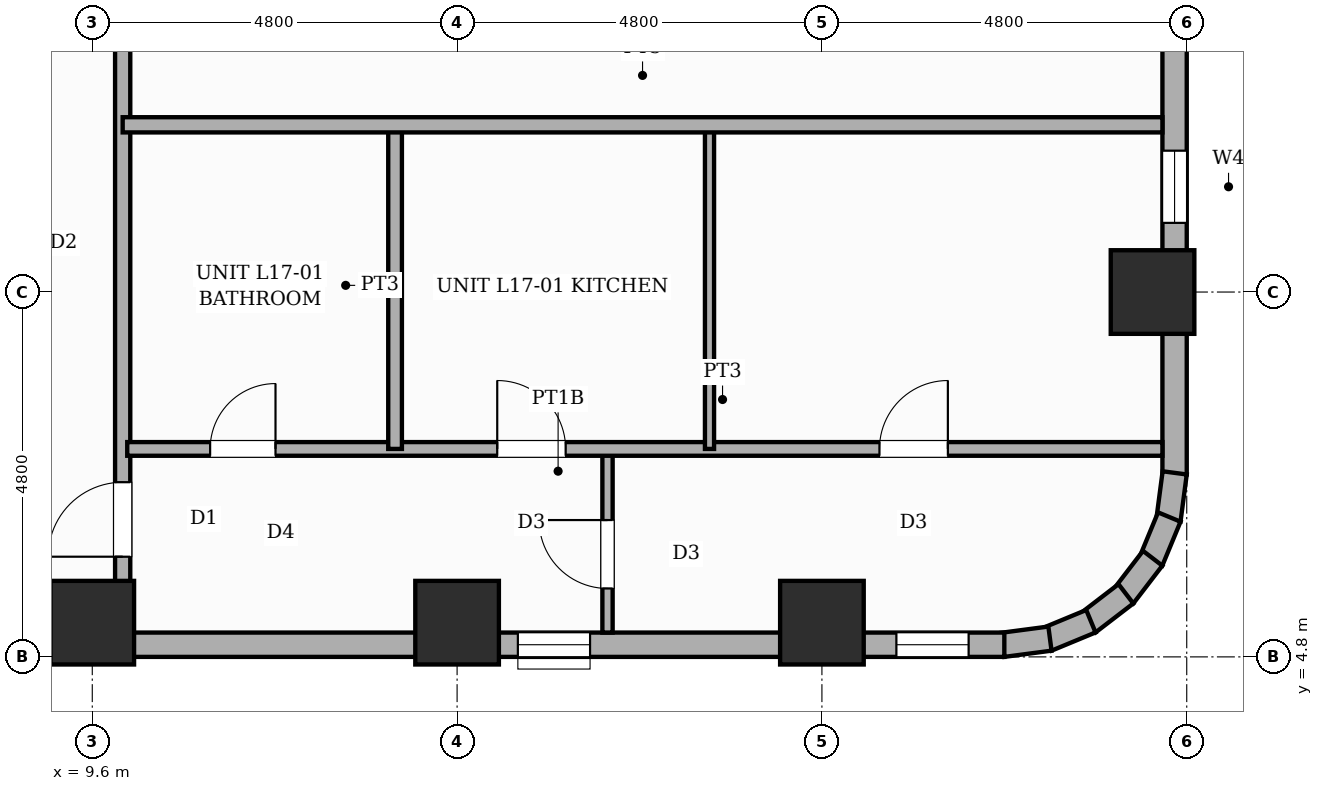
"""IFC4 building model, lengths in metres.
Left out: names, types, materials, properties, quantities, classifications, styles, units other than length and angle.
Written with IfcOpenShell. Run it as: python <this file> out.ifc"""

import sys

from ifc_helpers import new_model, si_unit, direction, frame, frame_2d, origin, origin_2d, place, context, subcontext, project, spatial, rectangle, extrude, element, fill, save


model = new_model("IFC4")
c1 = context("Model", 3, precision=1e-05, world=origin(), true_north=direction((0.0, 1.0)))
c2 = subcontext(c1, "Body", "Model", "MODEL_VIEW")
j1 = project(units=[si_unit("LENGTHUNIT", "METRE"), si_unit("PLANEANGLEUNIT", "RADIAN")], contexts=[c1])
p1 = place(None, origin())
s1 = spatial("IfcSite", under=j1, at=p1, CompositionType="ELEMENT")
p2 = place(p1, origin())
s2 = spatial("IfcBuilding", under=s1, at=p2, CompositionType="ELEMENT")
p3 = place(p2, frame((0.0, 0.0, 68.2)))
s3 = spatial("IfcBuildingStorey", under=s2, at=p3, CompositionType="ELEMENT", Elevation=68.2)
for number, where, z_axis, x_axis in (
    (1, (9.6, 5.25, 0.0), (0.0, 0.0, 1.0), (1.0, 0.0, 0.0)),
    (2, (14.4, 5.25, 0.0), (0.0, 0.0, 1.0), (1.0, 0.0, 0.0)),
    (3, (19.2, 5.25, 0.0), (0.0, 0.0, 1.0), (1.0, 0.0, 0.0)),
    (4, (23.55, 9.6, 0.0), (0.0, 0.0, 1.0), (1.0, 0.0, 0.0)),
):
    element("IfcColumn", number, at=place(p3, frame(where, z_axis=z_axis, x_axis=x_axis)), inside=s3, PredefinedType="COLUMN", context=c2, shape_type="SweptSolid", body=[
        extrude(rectangle(XDim=1.1, YDim=1.1, at=origin_2d()), origin(), (0.0, 0.0, 1.0), 3.6),
    ])
p4 = place(p3, frame((23.84, 26.4, 0.0), z_axis=(0.0, 0.0, 1.0), x_axis=(0.0, -1.0, 0.0)))
e5 = element("IfcWall", 5, at=p4, inside=s3, PredefinedType="STANDARD", context=c2, shape_type="SweptSolid", body=[
    extrude(rectangle(XDim=19.2, YDim=0.32, at=frame_2d((9.6, 0.0))), origin(), (0.0, 0.0, 1.0), 2.53),
])
p5 = place(p4, frame((14.94, 0.0, 0.45)))
e6 = element("IfcOpeningElement", 6, at=p5, cuts=e5, PredefinedType="OPENING", context=c2, shape_type="SweptSolid", body=[
    extrude(rectangle(XDim=0.95, YDim=1.8, at=frame_2d((0.475, 0.9))), frame((0.0, 0.17, 0.0), z_axis=(0.0, -1.0, 0.0), x_axis=(1.0, 0.0, 0.0)), (0.0, 0.0, 1.0), 0.34),
])
p6 = place(p4, frame((8.204, 0.0, 0.65)))
e7 = element("IfcOpeningElement", 7, at=p6, cuts=e5, PredefinedType="OPENING", context=c2, shape_type="SweptSolid", body=[
    extrude(rectangle(XDim=1.4, YDim=1.1, at=frame_2d((0.7, 0.55))), frame((0.0, 0.17, 0.0), z_axis=(0.0, -1.0, 0.0), x_axis=(1.0, 0.0, 0.0)), (0.0, 0.0, 1.0), 0.34),
])
p7 = place(p4, frame((0.88, 0.0, 0.45)))
e8 = element("IfcOpeningElement", 8, at=p7, cuts=e5, PredefinedType="OPENING", context=c2, shape_type="SweptSolid", body=[
    extrude(rectangle(XDim=0.75, YDim=1.8, at=frame_2d((0.375, 0.9))), frame((0.0, 0.17, 0.0), z_axis=(0.0, -1.0, 0.0), x_axis=(1.0, 0.0, 0.0)), (0.0, 0.0, 1.0), 0.34),
])
p8 = place(p4, frame((10.259, 0.0, 0.45)))
e9 = element("IfcOpeningElement", 9, at=p8, cuts=e5, PredefinedType="OPENING", context=c2, shape_type="SweptSolid", body=[
    extrude(rectangle(XDim=0.95, YDim=1.8, at=frame_2d((0.475, 0.9))), frame((0.0, 0.17, 0.0), z_axis=(0.0, -1.0, 0.0), x_axis=(1.0, 0.0, 0.0)), (0.0, 0.0, 1.0), 0.34),
])
p9 = place(p4, frame((4.838, 0.0, 0.65)))
e10 = element("IfcOpeningElement", 10, at=p9, cuts=e5, PredefinedType="OPENING", context=c2, shape_type="SweptSolid", body=[
    extrude(rectangle(XDim=1.4, YDim=1.1, at=frame_2d((0.7, 0.55))), frame((0.0, 0.17, 0.0), z_axis=(0.0, -1.0, 0.0), x_axis=(1.0, 0.0, 0.0)), (0.0, 0.0, 1.0), 0.34),
])
p10 = place(p3, frame((23.841, 7.221, 0.0), z_axis=(0.0, 0.0, 1.0), x_axis=(-0.130504898859, -0.991447664465, 0.0)))
e11 = element("IfcWall", 11, at=p10, inside=s3, PredefinedType="STANDARD", context=c2, shape_type="SweptSolid", body=[
    extrude(rectangle(XDim=0.627, YDim=0.32, at=frame_2d((0.313, 0.0))), origin(), (0.0, 0.0, 1.0), 3.35),
])
p11 = place(p3, frame((23.771, 6.64, 0.0), z_axis=(0.0, 0.0, 1.0), x_axis=(-0.382787856107, -0.923836271867, 0.0)))
e12 = element("IfcWall", 12, at=p11, inside=s3, PredefinedType="STANDARD", context=c2, shape_type="SweptSolid", body=[
    extrude(rectangle(XDim=0.626, YDim=0.32, at=frame_2d((0.313, 0.0))), origin(), (0.0, 0.0, 1.0), 3.35),
])
p12 = place(p3, frame((23.552, 6.097, 0.0), z_axis=(0.0, 0.0, 1.0), x_axis=(-0.608693302629, -0.793405610854, 0.0)))
e13 = element("IfcWall", 13, at=p12, inside=s3, PredefinedType="STANDARD", context=c2, shape_type="SweptSolid", body=[
    extrude(rectangle(XDim=0.626, YDim=0.32, at=frame_2d((0.313, 0.0))), origin(), (0.0, 0.0, 1.0), 3.35),
])
p13 = place(p3, frame((23.2, 5.63, 0.0), z_axis=(0.0, 0.0, 1.0), x_axis=(-0.7932174212, -0.608938521285, 0.0)))
e14 = element("IfcWall", 14, at=p13, inside=s3, PredefinedType="STANDARD", context=c2, shape_type="SweptSolid", body=[
    extrude(rectangle(XDim=0.627, YDim=0.32, at=frame_2d((0.313, 0.0))), origin(), (0.0, 0.0, 1.0), 3.35),
])
for number, where, z_axis, x_axis in (
    (15, (22.739, 5.269, 0.0), (0.0, 0.0, 1.0), (-0.924, -0.383, 0.0)),
    (16, (22.2, 5.04, 0.0), (0.0, 0.0, 1.0), (-0.991, -0.131, 0.0)),
):
    element("IfcWall", number, at=place(p3, frame(where, z_axis=z_axis, x_axis=x_axis)), inside=s3, PredefinedType="STANDARD", context=c2, shape_type="SweptSolid", body=[
        extrude(rectangle(XDim=0.626, YDim=0.32, at=frame_2d((0.313, 0.0))), origin(), (0.0, 0.0, 1.0), 3.35),
    ])
p14 = place(p3, frame((21.6, 4.96, 0.0), z_axis=(0.0, 0.0, 1.0), x_axis=(-1.0, 0.0, 0.0)))
e17 = element("IfcWall", 17, at=p14, inside=s3, PredefinedType="STANDARD", context=c2, shape_type="SweptSolid", body=[
    extrude(rectangle(XDim=14.4, YDim=0.32, at=frame_2d((7.2, 0.0))), origin(), (0.0, 0.0, 1.0), 2.53),
])
p15 = place(p14, frame((5.45, 0.0, 0.45)))
e18 = element("IfcOpeningElement", 18, at=p15, cuts=e17, PredefinedType="OPENING", context=c2, shape_type="SweptSolid", body=[
    extrude(rectangle(XDim=0.95, YDim=1.8, at=frame_2d((0.475, 0.9))), frame((0.0, 0.17, 0.0), z_axis=(0.0, -1.0, 0.0), x_axis=(1.0, 0.0, 0.0)), (0.0, 0.0, 1.0), 0.34),
])
p16 = place(p14, frame((0.47, 0.0, 0.45)))
e19 = element("IfcOpeningElement", 19, at=p16, cuts=e17, PredefinedType="OPENING", context=c2, shape_type="SweptSolid", body=[
    extrude(rectangle(XDim=0.95, YDim=1.8, at=frame_2d((0.475, 0.9))), frame((0.0, 0.17, 0.0), z_axis=(0.0, -1.0, 0.0), x_axis=(1.0, 0.0, 0.0)), (0.0, 0.0, 1.0), 0.34),
])
p17 = place(p3, frame((10.0, 5.12, 0.0), z_axis=(0.0, 0.0, 1.0), x_axis=(0.0, 1.0, 0.0)))
e20 = element("IfcWall", 20, at=p17, inside=s3, PredefinedType="PARTITIONING", context=c2, shape_type="SweptSolid", body=[
    extrude(rectangle(XDim=20.63, YDim=0.2, at=frame_2d((10.315, 0.0))), origin(), (0.0, 0.0, 1.0), 3.35),
])
p18 = place(p17, frame((0.998, 0.0, 0.0)))
e21 = element("IfcOpeningElement", 21, at=p18, cuts=e20, PredefinedType="OPENING", context=c2, shape_type="SweptSolid", body=[
    extrude(rectangle(XDim=0.98, YDim=2.18, at=frame_2d((0.49, 1.09))), frame((0.0, 0.11, 0.0), z_axis=(0.0, -1.0, 0.0), x_axis=(1.0, 0.0, 0.0)), (0.0, 0.0, 1.0), 0.22),
])
p19 = place(p17, frame((8.491, 0.0, 0.0)))
e22 = element("IfcOpeningElement", 22, at=p19, cuts=e20, PredefinedType="OPENING", context=c2, shape_type="SweptSolid", body=[
    extrude(rectangle(XDim=0.98, YDim=2.18, at=frame_2d((0.49, 1.09))), frame((0.0, 0.11, 0.0), z_axis=(0.0, -1.0, 0.0), x_axis=(1.0, 0.0, 0.0)), (0.0, 0.0, 1.0), 0.22),
])
p20 = place(p17, frame((14.787, 0.0, 0.0)))
e23 = element("IfcOpeningElement", 23, at=p20, cuts=e20, PredefinedType="OPENING", context=c2, shape_type="SweptSolid", body=[
    extrude(rectangle(XDim=0.98, YDim=2.18, at=frame_2d((0.49, 1.09))), frame((0.0, 0.11, 0.0), z_axis=(0.0, -1.0, 0.0), x_axis=(1.0, 0.0, 0.0)), (0.0, 0.0, 1.0), 0.22),
])
p21 = place(p3, frame((16.379, 5.12, 0.0), z_axis=(0.0, 0.0, 1.0), x_axis=(0.0, 1.0, 0.0)))
e24 = element("IfcWall", 24, at=p21, inside=s3, PredefinedType="PARTITIONING", context=c2, shape_type="SweptSolid", body=[
    extrude(rectangle(XDim=2.416, YDim=0.135, at=frame_2d((1.208, 0.0))), origin(), (0.0, 0.0, 1.0), 3.35),
])
p22 = place(p21, frame((0.58, 0.0, 0.0)))
e25 = element("IfcOpeningElement", 25, at=p22, cuts=e24, PredefinedType="OPENING", context=c2, shape_type="SweptSolid", body=[
    extrude(rectangle(XDim=0.9, YDim=2.15, at=frame_2d((0.45, 1.075))), frame((0.0, 0.078, 0.0), z_axis=(0.0, -1.0, 0.0), x_axis=(1.0, 0.0, 0.0)), (0.0, 0.0, 1.0), 0.155),
])
p23 = place(p3, frame((10.06, 7.536, 0.0), z_axis=(0.0, 0.0, 1.0), x_axis=(1.0, 0.0, 0.0)))
e26 = element("IfcWall", 26, at=p23, inside=s3, PredefinedType="PLUMBINGWALL", context=c2, shape_type="SweptSolid", body=[
    extrude(rectangle(XDim=13.62, YDim=0.18, at=frame_2d((6.81, 0.0))), origin(), (0.0, 0.0, 1.0), 3.35),
])
p24 = place(p23, frame((1.091, 0.0, 0.0)))
e27 = element("IfcOpeningElement", 27, at=p24, cuts=e26, PredefinedType="OPENING", context=c2, shape_type="SweptSolid", body=[
    extrude(rectangle(XDim=0.86, YDim=2.1, at=frame_2d((0.43, 1.05))), frame((0.0, 0.1, 0.0), z_axis=(0.0, -1.0, 0.0), x_axis=(1.0, 0.0, 0.0)), (0.0, 0.0, 1.0), 0.2),
])
p25 = place(p23, frame((4.868, 0.0, 0.0)))
e28 = element("IfcOpeningElement", 28, at=p25, cuts=e26, PredefinedType="OPENING", context=c2, shape_type="SweptSolid", body=[
    extrude(rectangle(XDim=0.9, YDim=2.15, at=frame_2d((0.45, 1.075))), frame((0.0, 0.1, 0.0), z_axis=(0.0, -1.0, 0.0), x_axis=(1.0, 0.0, 0.0)), (0.0, 0.0, 1.0), 0.2),
])
p26 = place(p23, frame((9.897, 0.0, 0.0)))
e29 = element("IfcOpeningElement", 29, at=p26, cuts=e26, PredefinedType="OPENING", context=c2, shape_type="SweptSolid", body=[
    extrude(rectangle(XDim=0.9, YDim=2.15, at=frame_2d((0.45, 1.075))), frame((0.0, 0.1, 0.0), z_axis=(0.0, -1.0, 0.0), x_axis=(1.0, 0.0, 0.0)), (0.0, 0.0, 1.0), 0.2),
])
p27 = place(p3, frame((13.584, 7.536, 0.0), z_axis=(0.0, 0.0, 1.0), x_axis=(0.0, 1.0, 0.0)))
e30 = element("IfcWall", 30, at=p27, inside=s3, PredefinedType="PLUMBINGWALL", context=c2, shape_type="SweptSolid", body=[
    extrude(rectangle(XDim=4.304, YDim=0.18, at=frame_2d((2.152, 0.0))), origin(), (0.0, 0.0, 1.0), 3.35),
])
p28 = place(p3, frame((17.721, 7.536, 0.0), z_axis=(0.0, 0.0, 1.0), x_axis=(0.0, 1.0, 0.0)))
e31 = element("IfcWall", 31, at=p28, inside=s3, PredefinedType="PARTITIONING", context=c2, shape_type="SweptSolid", body=[
    extrude(rectangle(XDim=4.304, YDim=0.12, at=frame_2d((2.152, 0.0))), origin(), (0.0, 0.0, 1.0), 3.35),
])
p29 = place(p3, frame((10.0, 11.8, 0.0), z_axis=(0.0, 0.0, 1.0), x_axis=(1.0, 0.0, 0.0)))
e32 = element("IfcWall", 32, at=p29, inside=s3, PredefinedType="SOLIDWALL", context=c2, shape_type="SweptSolid", body=[
    extrude(rectangle(XDim=13.68, YDim=0.2, at=frame_2d((6.84, 0.0))), origin(), (0.0, 0.0, 1.0), 3.35),
])
p30 = place(p5, origin())
e33 = element("IfcWindow", 33, at=p30, inside=s3, PartitioningType="SINGLE_PANEL", PredefinedType="WINDOW", context=c2, shape_type="SweptSolid", body=[
    extrude(rectangle(XDim=0.95, YDim=1.8, at=frame_2d((0.475, 0.9))), frame((0.0, 0.03, 0.0), z_axis=(0.0, -1.0, 0.0), x_axis=(1.0, 0.0, 0.0)), (0.0, 0.0, 1.0), 0.06),
])
fill(e6, e33)
p31 = place(p15, origin())
e34 = element("IfcWindow", 34, at=p31, inside=s3, PartitioningType="SINGLE_PANEL", PredefinedType="WINDOW", context=c2, shape_type="SweptSolid", body=[
    extrude(rectangle(XDim=0.95, YDim=1.8, at=frame_2d((0.475, 0.9))), frame((0.0, 0.03, 0.0), z_axis=(0.0, -1.0, 0.0), x_axis=(1.0, 0.0, 0.0)), (0.0, 0.0, 1.0), 0.06),
])
fill(e18, e34)
p32 = place(p16, origin())
e35 = element("IfcWindow", 35, at=p32, inside=s3, PartitioningType="SINGLE_PANEL", PredefinedType="WINDOW", context=c2, shape_type="SweptSolid", body=[
    extrude(rectangle(XDim=0.95, YDim=1.8, at=frame_2d((0.475, 0.9))), frame((0.0, 0.03, 0.0), z_axis=(0.0, -1.0, 0.0), x_axis=(1.0, 0.0, 0.0)), (0.0, 0.0, 1.0), 0.06),
])
fill(e19, e35)
p33 = place(p18, origin())
e36 = element("IfcDoor", 36, at=p33, inside=s3, OperationType="SINGLE_SWING_LEFT", PredefinedType="DOOR", context=c2, shape_type="SweptSolid", body=[
    extrude(rectangle(XDim=0.98, YDim=2.18, at=frame_2d((0.49, 1.09))), frame((0.0, 0.025, 0.0), z_axis=(0.0, -1.0, 0.0), x_axis=(1.0, 0.0, 0.0)), (0.0, 0.0, 1.0), 0.05),
])
fill(e21, e36)
p34 = place(p22, origin())
e37 = element("IfcDoor", 37, at=p34, inside=s3, OperationType="SINGLE_SWING_RIGHT", PredefinedType="DOOR", context=c2, shape_type="SweptSolid", body=[
    extrude(rectangle(XDim=0.9, YDim=2.15, at=frame_2d((0.45, 1.075))), frame((0.0, 0.025, 0.0), z_axis=(0.0, -1.0, 0.0), x_axis=(1.0, 0.0, 0.0)), (0.0, 0.0, 1.0), 0.05),
])
fill(e25, e37)
p35 = place(p24, origin())
e38 = element("IfcDoor", 38, at=p35, inside=s3, OperationType="SINGLE_SWING_RIGHT", PredefinedType="DOOR", context=c2, shape_type="SweptSolid", body=[
    extrude(rectangle(XDim=0.86, YDim=2.1, at=frame_2d((0.43, 1.05))), frame((0.0, 0.025, 0.0), z_axis=(0.0, -1.0, 0.0), x_axis=(1.0, 0.0, 0.0)), (0.0, 0.0, 1.0), 0.05),
])
fill(e27, e38)
p36 = place(p25, origin())
e39 = element("IfcDoor", 39, at=p36, inside=s3, OperationType="SINGLE_SWING_LEFT", PredefinedType="DOOR", context=c2, shape_type="SweptSolid", body=[
    extrude(rectangle(XDim=0.9, YDim=2.15, at=frame_2d((0.45, 1.075))), frame((0.0, 0.025, 0.0), z_axis=(0.0, -1.0, 0.0), x_axis=(1.0, 0.0, 0.0)), (0.0, 0.0, 1.0), 0.05),
])
fill(e28, e39)
p37 = place(p26, origin())
e40 = element("IfcDoor", 40, at=p37, inside=s3, OperationType="SINGLE_SWING_RIGHT", PredefinedType="DOOR", context=c2, shape_type="SweptSolid", body=[
    extrude(rectangle(XDim=0.9, YDim=2.15, at=frame_2d((0.45, 1.075))), frame((0.0, 0.025, 0.0), z_axis=(0.0, -1.0, 0.0), x_axis=(1.0, 0.0, 0.0)), (0.0, 0.0, 1.0), 0.05),
])
fill(e29, e40)
save(model, sys.argv[1])
